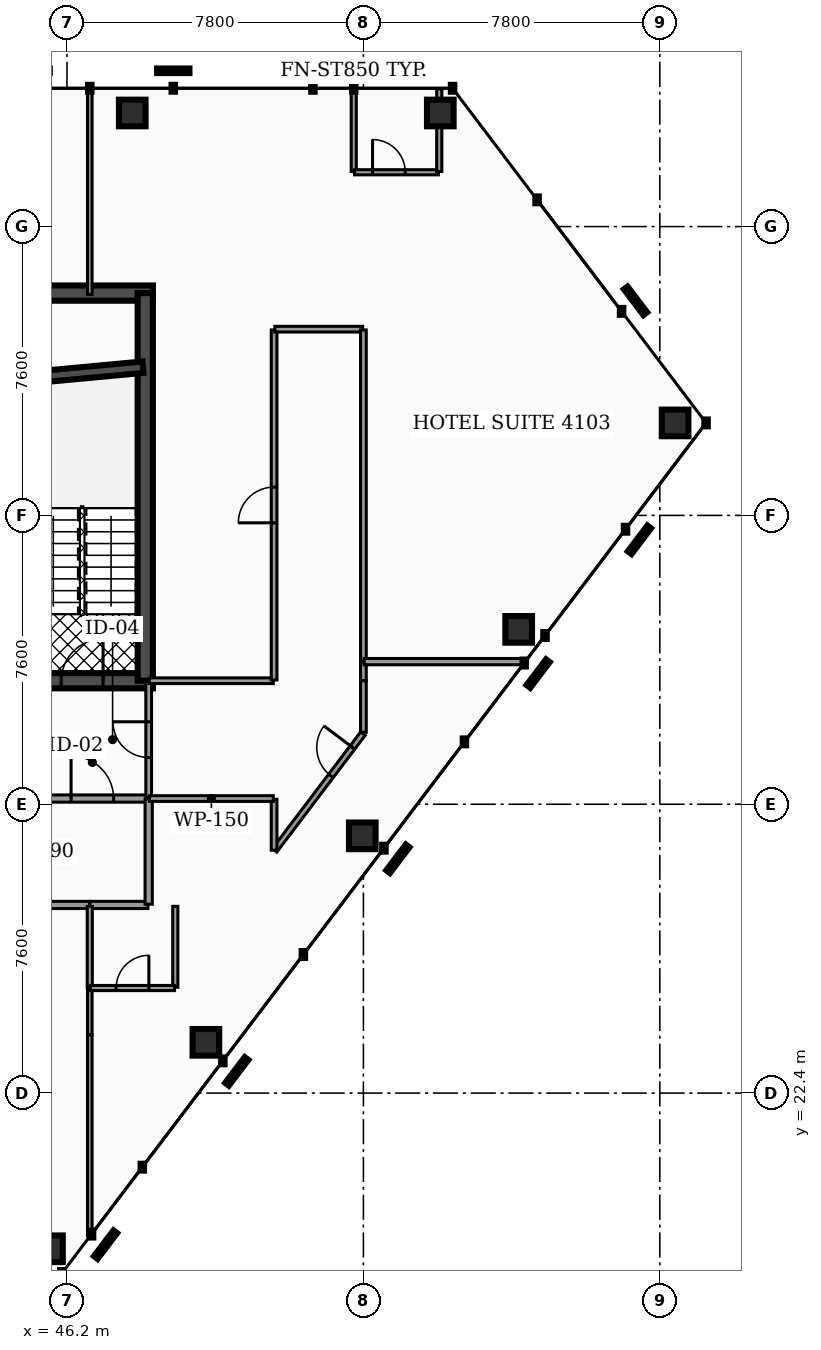
"""IFC4 building model, lengths in metres.
Left out: names, types, materials, properties, quantities, classifications, styles, units other than length and angle.
Written with IfcOpenShell. Run it as: python <this file> out.ifc"""

import sys

from ifc_helpers import new_model, si_unit, direction, frame, frame_2d, origin, origin_2d, place, context, subcontext, project, spatial, rectangle, hollow_rectangle, extrude, element, fill, save


model = new_model("IFC4")
c1 = context("Model", 3, precision=1e-05, world=origin(), true_north=direction((0.0, 1.0)))
c2 = subcontext(c1, "Body", "Model", "MODEL_VIEW")
j1 = project(units=[si_unit("LENGTHUNIT", "METRE"), si_unit("PLANEANGLEUNIT", "RADIAN")], contexts=[c1])
p1 = place(None, origin())
s1 = spatial("IfcSite", under=j1, at=p1, CompositionType="ELEMENT")
p2 = place(p1, origin())
s2 = spatial("IfcBuilding", under=s1, at=p2, CompositionType="ELEMENT")
p3 = place(p2, frame((0.0, 0.0, 168.3)))
s3 = spatial("IfcBuildingStorey", under=s2, at=p3, CompositionType="ELEMENT", Elevation=168.3)
p4 = place(p3, frame((28.4, 43.45, 0.0), z_axis=(0.0, 0.0, 1.0), x_axis=(1.0, 0.0, 0.0)))
e1 = element("IfcWall", 1, at=p4, inside=s3, PredefinedType="SHEAR", context=c2, shape_type="SweptSolid", body=[
    extrude(rectangle(XDim=20.06, YDim=0.4, at=frame_2d((10.03, 0.0))), origin(), (0.0, 0.0, 1.0), 3.5),
])
p5 = place(p3, frame((28.4, 33.25, 0.0), z_axis=(0.0, 0.0, 1.0), x_axis=(1.0, 0.0, 0.0)))
e2 = element("IfcWall", 2, at=p5, inside=s3, PredefinedType="SHEAR", context=c2, shape_type="SweptSolid", body=[
    extrude(rectangle(XDim=20.06, YDim=0.4, at=frame_2d((10.03, 0.0))), origin(), (0.0, 0.0, 1.0), 3.5),
])
p6 = place(p5, frame((4.03, 0.0, 0.0)))
e3 = element("IfcOpeningElement", 3, at=p6, cuts=e2, PredefinedType="OPENING", context=c2, shape_type="SweptSolid", body=[
    extrude(rectangle(XDim=1.1, YDim=2.15, at=frame_2d((0.55, 1.075))), frame((0.0, 0.21, 0.0), z_axis=(0.0, -1.0, 0.0), x_axis=(1.0, 0.0, 0.0)), (0.0, 0.0, 1.0), 0.42),
])
p7 = place(p5, frame((14.87, 0.0, 0.0)))
e4 = element("IfcOpeningElement", 4, at=p7, cuts=e2, PredefinedType="OPENING", context=c2, shape_type="SweptSolid", body=[
    extrude(rectangle(XDim=1.1, YDim=2.15, at=frame_2d((0.55, 1.075))), frame((0.0, 0.21, 0.0), z_axis=(0.0, -1.0, 0.0), x_axis=(1.0, 0.0, 0.0)), (0.0, 0.0, 1.0), 0.42),
])
p8 = place(p5, frame((5.95, 0.0, 0.0)))
e5 = element("IfcOpeningElement", 5, at=p8, cuts=e2, PredefinedType="OPENING", context=c2, shape_type="SweptSolid", body=[
    extrude(rectangle(XDim=1.0, YDim=2.1, at=frame_2d((0.5, 1.05))), frame((0.0, 0.21, 0.0), z_axis=(0.0, -1.0, 0.0), x_axis=(1.0, 0.0, 0.0)), (0.0, 0.0, 1.0), 0.42),
])
p9 = place(p5, frame((7.65, 0.0, 0.0)))
e6 = element("IfcOpeningElement", 6, at=p9, cuts=e2, PredefinedType="OPENING", context=c2, shape_type="SweptSolid", body=[
    extrude(rectangle(XDim=1.0, YDim=2.1, at=frame_2d((0.5, 1.05))), frame((0.0, 0.21, 0.0), z_axis=(0.0, -1.0, 0.0), x_axis=(1.0, 0.0, 0.0)), (0.0, 0.0, 1.0), 0.42),
])
p10 = place(p5, frame((1.31, 0.0, 0.0)))
e7 = element("IfcOpeningElement", 7, at=p10, cuts=e2, PredefinedType="OPENING", context=c2, shape_type="SweptSolid", body=[
    extrude(rectangle(XDim=1.1, YDim=2.2, at=frame_2d((0.55, 1.1))), frame((0.0, 0.21, 0.0), z_axis=(0.0, -1.0, 0.0), x_axis=(1.0, 0.0, 0.0)), (0.0, 0.0, 1.0), 0.42),
])
p11 = place(p5, frame((9.44, 0.0, 0.0)))
e8 = element("IfcOpeningElement", 8, at=p11, cuts=e2, PredefinedType="OPENING", context=c2, shape_type="SweptSolid", body=[
    extrude(rectangle(XDim=1.12, YDim=2.05, at=frame_2d((0.56, 1.025))), frame((0.0, 0.21, 0.0), z_axis=(0.0, -1.0, 0.0), x_axis=(1.0, 0.0, 0.0)), (0.0, 0.0, 1.0), 0.42),
])
p12 = place(p5, frame((17.65, 0.0, 0.0)))
e9 = element("IfcOpeningElement", 9, at=p12, cuts=e2, PredefinedType="OPENING", context=c2, shape_type="SweptSolid", body=[
    extrude(rectangle(XDim=1.1, YDim=2.2, at=frame_2d((0.55, 1.1))), frame((0.0, 0.21, 0.0), z_axis=(0.0, -1.0, 0.0), x_axis=(1.0, 0.0, 0.0)), (0.0, 0.0, 1.0), 0.42),
])
p13 = place(p3, frame((48.26, 33.25, 0.0), z_axis=(0.0, 0.0, 1.0), x_axis=(0.0, 1.0, 0.0)))
e10 = element("IfcWall", 10, at=p13, inside=s3, PredefinedType="SHEAR", context=c2, shape_type="SweptSolid", body=[
    extrude(rectangle(XDim=10.2, YDim=0.4, at=frame_2d((5.1, 0.0))), origin(), (0.0, 0.0, 1.0), 3.5),
])
p14 = place(p3, frame((44.98, 41.2, 0.0), z_axis=(0.0, 0.0, 1.0), x_axis=(0.995686468965, 0.09278176286, 0.0)))
e11 = element("IfcWall", 11, at=p14, inside=s3, PredefinedType="SHEAR", context=c2, shape_type="SweptSolid", body=[
    extrude(rectangle(XDim=3.234, YDim=0.3, at=frame_2d((1.617, 0.0))), origin(), (0.0, 0.0, 1.0), 3.5),
])
for number, where, z_axis, x_axis in (
    (12, (56.024, 48.189, 0.0), (0.0, 0.0, 1.0), (1.0, 0.0, 0.0)),
    (13, (47.917, 48.189, 0.0), (0.0, 0.0, 1.0), (1.0, 0.0, 0.0)),
    (14, (45.74, 18.303, 0.0), (0.0, 0.0, 1.0), (1.0, 0.0, 0.0)),
    (15, (49.855, 23.736, 0.0), (0.0, 0.0, 1.0), (1.0, 0.0, 0.0)),
    (16, (53.971, 29.168, 0.0), (0.0, 0.0, 1.0), (1.0, 0.0, 0.0)),
    (17, (58.086, 34.601, 0.0), (0.0, 0.0, 1.0), (1.0, 0.0, 0.0)),
    (18, (62.202, 40.034, 0.0), (0.0, 0.0, 1.0), (1.0, 0.0, 0.0)),
):
    element("IfcColumn", number, at=place(p3, frame(where, z_axis=z_axis, x_axis=x_axis)), inside=s3, PredefinedType="COLUMN", context=c2, shape_type="SweptSolid", body=[
        extrude(hollow_rectangle(XDim=0.7, YDim=0.7, WallThickness=0.035, at=origin_2d()), origin(), (0.0, 0.0, 1.0), 3.5),
    ])
p15 = place(p3, frame((45.405, 30.15, 0.0), z_axis=(0.0, 0.0, 1.0), x_axis=(1.0, 0.0, 0.0)))
e19 = element("IfcWall", 19, at=p15, inside=s3, PredefinedType="PARTITIONING", context=c2, shape_type="SweptSolid", body=[
    extrude(rectangle(XDim=2.925, YDim=0.19, at=frame_2d((1.462, 0.0))), origin(), (0.0, 0.0, 1.0), 2.457),
])
p16 = place(p15, frame((0.903, 0.0, 0.0)))
e20 = element("IfcOpeningElement", 20, at=p16, cuts=e19, PredefinedType="OPENING", context=c2, shape_type="SweptSolid", body=[
    extrude(rectangle(XDim=1.12, YDim=2.05, at=frame_2d((0.56, 1.025))), frame((0.0, 0.105, 0.0), z_axis=(0.0, -1.0, 0.0), x_axis=(1.0, 0.0, 0.0)), (0.0, 0.0, 1.0), 0.21),
])
p17 = place(p3, frame((48.35, 30.17, 0.0), z_axis=(0.0, 0.0, 1.0), x_axis=(0.0, 1.0, 0.0)))
e21 = element("IfcWall", 21, at=p17, inside=s3, PredefinedType="PARTITIONING", context=c2, shape_type="SweptSolid", body=[
    extrude(rectangle(XDim=3.06, YDim=0.15, at=frame_2d((1.53, 0.0))), origin(), (0.0, 0.0, 1.0), 2.457),
])
p18 = place(p17, frame((1.06, 0.0, 0.0)))
e22 = element("IfcOpeningElement", 22, at=p18, cuts=e21, PredefinedType="OPENING", context=c2, shape_type="SweptSolid", body=[
    extrude(rectangle(XDim=0.94, YDim=2.05, at=frame_2d((0.47, 1.025))), frame((0.0, 0.085, 0.0), z_axis=(0.0, -1.0, 0.0), x_axis=(1.0, 0.0, 0.0)), (0.0, 0.0, 1.0), 0.17),
])
p19 = place(p3, frame((45.42, 27.35, 0.0), z_axis=(0.0, 0.0, 1.0), x_axis=(1.0, 0.0, 0.0)))
e23 = element("IfcWall", 23, at=p19, inside=s3, PredefinedType="PARTITIONING", context=c2, shape_type="SweptSolid", body=[
    extrude(rectangle(XDim=1.375, YDim=0.19, at=frame_2d((0.688, 0.0))), origin(), (0.0, 0.0, 1.0), 2.457),
])
p20 = place(p3, frame((46.805, 27.35, 0.0), z_axis=(0.0, 0.0, 1.0), x_axis=(1.0, 0.0, 0.0)))
e24 = element("IfcWall", 24, at=p20, inside=s3, PredefinedType="PARTITIONING", context=c2, shape_type="SweptSolid", body=[
    extrude(rectangle(XDim=1.525, YDim=0.19, at=frame_2d((0.763, 0.0))), origin(), (0.0, 0.0, 1.0), 2.457),
])
p21 = place(p3, frame((48.35, 27.37, 0.0), z_axis=(0.0, 0.0, 1.0), x_axis=(0.0, 1.0, 0.0)))
e25 = element("IfcWall", 25, at=p21, inside=s3, PredefinedType="PARTITIONING", context=c2, shape_type="SweptSolid", body=[
    extrude(rectangle(XDim=2.76, YDim=0.19, at=frame_2d((1.38, 0.0))), origin(), (0.0, 0.0, 1.0), 2.457),
])
p22 = place(p3, frame((54.0, 33.25, 0.0), z_axis=(0.0, 0.0, 1.0), x_axis=(0.0, 1.0, 0.0)))
e26 = element("IfcWall", 26, at=p22, inside=s3, PredefinedType="PARTITIONING", context=c2, shape_type="SweptSolid", body=[
    extrude(rectangle(XDim=0.498, YDim=0.15, at=frame_2d((0.249, 0.0))), origin(), (0.0, 0.0, 1.0), 2.457),
])
p23 = place(p3, frame((54.0, 31.894, 0.0), z_axis=(0.0, 0.0, 1.0), x_axis=(0.0, 1.0, 0.0)))
e27 = element("IfcWall", 27, at=p23, inside=s3, PredefinedType="PARTITIONING", context=c2, shape_type="SweptSolid", body=[
    extrude(rectangle(XDim=1.356, YDim=0.15, at=frame_2d((0.678, 0.0))), origin(), (0.0, 0.0, 1.0), 2.457),
])
p24 = place(p3, frame((51.662, 28.787, 0.0), z_axis=(0.0, 0.0, 1.0), x_axis=(0.603806431354, 0.797130976349, 0.0)))
e28 = element("IfcWall", 28, at=p24, inside=s3, PredefinedType="PARTITIONING", context=c2, shape_type="SweptSolid", body=[
    extrude(rectangle(XDim=3.852, YDim=0.15, at=frame_2d((1.926, 0.0))), origin(), (0.0, 0.0, 1.0), 2.457),
])
p25 = place(p24, frame((2.456, 0.0, 0.0)))
e29 = element("IfcOpeningElement", 29, at=p25, cuts=e28, PredefinedType="OPENING", context=c2, shape_type="SweptSolid", body=[
    extrude(rectangle(XDim=0.94, YDim=2.05, at=frame_2d((0.47, 1.025))), frame((0.0, 0.085, 0.0), z_axis=(0.0, -1.0, 0.0), x_axis=(1.0, 0.0, 0.0)), (0.0, 0.0, 1.0), 0.17),
])
p26 = place(p3, frame((51.65, 28.792, 0.0), z_axis=(0.0, 0.0, 1.0), x_axis=(0.0, 1.0, 0.0)))
e30 = element("IfcWall", 30, at=p26, inside=s3, PredefinedType="PARTITIONING", context=c2, shape_type="SweptSolid", body=[
    extrude(rectangle(XDim=1.338, YDim=0.15, at=frame_2d((0.669, 0.0))), origin(), (0.0, 0.0, 1.0), 2.457),
])
p27 = place(p3, frame((48.37, 30.15, 0.0), z_axis=(0.0, 0.0, 1.0), x_axis=(1.0, 0.0, 0.0)))
e31 = element("IfcWall", 31, at=p27, inside=s3, PredefinedType="PARTITIONING", context=c2, shape_type="SweptSolid", body=[
    extrude(rectangle(XDim=3.26, YDim=0.15, at=frame_2d((1.63, 0.0))), origin(), (0.0, 0.0, 1.0), 2.457),
])
p28 = place(p3, frame((48.365, 33.25, 0.0), z_axis=(0.0, 0.0, 1.0), x_axis=(1.0, 0.0, 0.0)))
e32 = element("IfcWall", 32, at=p28, inside=s3, PredefinedType="PARTITIONING", context=c2, shape_type="SweptSolid", body=[
    extrude(rectangle(XDim=3.265, YDim=0.15, at=frame_2d((1.632, 0.0))), origin(), (0.0, 0.0, 1.0), 2.457),
])
p29 = place(p3, frame((51.65, 33.27, 0.0), z_axis=(0.0, 0.0, 1.0), x_axis=(0.0, 1.0, 0.0)))
e33 = element("IfcWall", 33, at=p29, inside=s3, PredefinedType="PARTITIONING", context=c2, shape_type="SweptSolid", body=[
    extrude(rectangle(XDim=9.21, YDim=0.15, at=frame_2d((4.605, 0.0))), origin(), (0.0, 0.0, 1.0), 2.457),
])
p30 = place(p29, frame((4.135, 0.0, 0.0)))
e34 = element("IfcOpeningElement", 34, at=p30, cuts=e33, PredefinedType="OPENING", context=c2, shape_type="SweptSolid", body=[
    extrude(rectangle(XDim=0.94, YDim=2.05, at=frame_2d((0.47, 1.025))), frame((0.0, 0.085, 0.0), z_axis=(0.0, -1.0, 0.0), x_axis=(1.0, 0.0, 0.0)), (0.0, 0.0, 1.0), 0.17),
])
p31 = place(p3, frame((51.67, 42.5, 0.0), z_axis=(0.0, 0.0, 1.0), x_axis=(1.0, 0.0, 0.0)))
e35 = element("IfcWall", 35, at=p31, inside=s3, PredefinedType="PARTITIONING", context=c2, shape_type="SweptSolid", body=[
    extrude(rectangle(XDim=2.31, YDim=0.15, at=frame_2d((1.155, 0.0))), origin(), (0.0, 0.0, 1.0), 2.457),
])
p32 = place(p3, frame((54.0, 33.758, 0.0), z_axis=(0.0, 0.0, 1.0), x_axis=(0.0, 1.0, 0.0)))
e36 = element("IfcWall", 36, at=p32, inside=s3, PredefinedType="PARTITIONING", context=c2, shape_type="SweptSolid", body=[
    extrude(rectangle(XDim=8.722, YDim=0.15, at=frame_2d((4.361, 0.0))), origin(), (0.0, 0.0, 1.0), 2.457),
])
p33 = place(p3, frame((46.8, 23.932, 0.0), z_axis=(0.0, 0.0, 1.0), x_axis=(0.0, 1.0, 0.0)))
e37 = element("IfcWall", 37, at=p33, inside=s3, PredefinedType="PARTITIONING", context=c2, shape_type="SweptSolid", body=[
    extrude(rectangle(XDim=1.228, YDim=0.12, at=frame_2d((0.614, 0.0))), origin(), (0.0, 0.0, 1.0), 2.457),
])
p34 = place(p3, frame((46.8, 18.642, 0.0), z_axis=(0.0, 0.0, 1.0), x_axis=(0.0, 1.0, 0.0)))
e38 = element("IfcWall", 38, at=p34, inside=s3, PredefinedType="PARTITIONING", context=c2, shape_type="SweptSolid", body=[
    extrude(rectangle(XDim=5.29, YDim=0.12, at=frame_2d((2.645, 0.0))), origin(), (0.0, 0.0, 1.0), 2.457),
])
p35 = place(p3, frame((46.8, 25.169, 0.0), z_axis=(0.0, 0.0, 1.0), x_axis=(0.0, 1.0, 0.0)))
e39 = element("IfcWall", 39, at=p35, inside=s3, PredefinedType="PARTITIONING", context=c2, shape_type="SweptSolid", body=[
    extrude(rectangle(XDim=2.14, YDim=0.135, at=frame_2d((1.07, 0.0))), origin(), (0.0, 0.0, 1.0), 2.457),
])
p36 = place(p3, frame((46.8, 43.415, 0.0), z_axis=(0.0, 0.0, 1.0), x_axis=(0.0, 1.0, 0.0)))
e40 = element("IfcWall", 40, at=p36, inside=s3, PredefinedType="PARTITIONING", context=c2, shape_type="SweptSolid", body=[
    extrude(rectangle(XDim=5.409, YDim=0.12, at=frame_2d((2.705, 0.0))), origin(), (0.0, 0.0, 1.0), 2.457),
])
p37 = place(p3, frame((49.05, 25.184, 0.0), z_axis=(0.0, 0.0, 1.0), x_axis=(0.0, 1.0, 0.0)))
e41 = element("IfcWall", 41, at=p37, inside=s3, PredefinedType="PARTITIONING", context=c2, shape_type="SweptSolid", body=[
    extrude(rectangle(XDim=2.13, YDim=0.135, at=frame_2d((1.065, 0.0))), origin(), (0.0, 0.0, 1.0), 2.457),
])
p38 = place(p3, frame((46.82, 25.164, 0.0), z_axis=(0.0, 0.0, 1.0), x_axis=(1.0, 0.0, 0.0)))
e42 = element("IfcWall", 42, at=p38, inside=s3, PredefinedType="PARTITIONING", context=c2, shape_type="SweptSolid", body=[
    extrude(rectangle(XDim=2.21, YDim=0.135, at=frame_2d((1.105, 0.0))), origin(), (0.0, 0.0, 1.0), 2.457),
])
p39 = place(p38, frame((0.675, 0.0, 0.0)))
e43 = element("IfcOpeningElement", 43, at=p39, cuts=e42, PredefinedType="OPENING", context=c2, shape_type="SweptSolid", body=[
    extrude(rectangle(XDim=0.86, YDim=2.05, at=frame_2d((0.43, 1.025))), frame((0.0, 0.077, 0.0), z_axis=(0.0, -1.0, 0.0), x_axis=(1.0, 0.0, 0.0)), (0.0, 0.0, 1.0), 0.155),
])
p40 = place(p3, frame((54.02, 33.753, 0.0), z_axis=(0.0, 0.0, 1.0), x_axis=(1.0, 0.0, 0.0)))
e44 = element("IfcWall", 44, at=p40, inside=s3, PredefinedType="PARTITIONING", context=c2, shape_type="SweptSolid", body=[
    extrude(rectangle(XDim=4.224, YDim=0.165, at=frame_2d((2.112, 0.0))), origin(), (0.0, 0.0, 1.0), 2.457),
])
p41 = place(p3, frame((53.746, 46.649, 0.0), z_axis=(0.0, 0.0, 1.0), x_axis=(0.0, 1.0, 0.0)))
e45 = element("IfcWall", 45, at=p41, inside=s3, PredefinedType="PARTITIONING", context=c2, shape_type="SweptSolid", body=[
    extrude(rectangle(XDim=2.175, YDim=0.135, at=frame_2d((1.087, 0.0))), origin(), (0.0, 0.0, 1.0), 2.457),
])
p42 = place(p3, frame((53.766, 46.629, 0.0), z_axis=(0.0, 0.0, 1.0), x_axis=(1.0, 0.0, 0.0)))
e46 = element("IfcWall", 46, at=p42, inside=s3, PredefinedType="PARTITIONING", context=c2, shape_type="SweptSolid", body=[
    extrude(rectangle(XDim=2.21, YDim=0.135, at=frame_2d((1.105, 0.0))), origin(), (0.0, 0.0, 1.0), 2.457),
])
p43 = place(p42, frame((0.475, 0.0, 0.0)))
e47 = element("IfcOpeningElement", 47, at=p43, cuts=e46, PredefinedType="OPENING", context=c2, shape_type="SweptSolid", body=[
    extrude(rectangle(XDim=0.86, YDim=2.05, at=frame_2d((0.43, 1.025))), frame((0.0, 0.077, 0.0), z_axis=(0.0, -1.0, 0.0), x_axis=(1.0, 0.0, 0.0)), (0.0, 0.0, 1.0), 0.155),
])
p44 = place(p3, frame((55.996, 46.649, 0.0), z_axis=(0.0, 0.0, 1.0), x_axis=(0.0, 1.0, 0.0)))
e48 = element("IfcWall", 48, at=p44, inside=s3, PredefinedType="PARTITIONING", context=c2, shape_type="SweptSolid", body=[
    extrude(rectangle(XDim=2.175, YDim=0.135, at=frame_2d((1.087, 0.0))), origin(), (0.0, 0.0, 1.0), 2.457),
])
p45 = place(p12, origin())
e49 = element("IfcDoor", 49, at=p45, inside=s3, OperationType="SINGLE_SWING_RIGHT", PredefinedType="DOOR", context=c2, shape_type="SweptSolid", body=[
    extrude(rectangle(XDim=1.1, YDim=2.2, at=frame_2d((0.55, 1.1))), frame((0.0, 0.025, 0.0), z_axis=(0.0, -1.0, 0.0), x_axis=(1.0, 0.0, 0.0)), (0.0, 0.0, 1.0), 0.05),
])
fill(e9, e49)
p46 = place(p16, origin())
e50 = element("IfcDoor", 50, at=p46, inside=s3, OperationType="SINGLE_SWING_LEFT", PredefinedType="DOOR", context=c2, shape_type="SweptSolid", body=[
    extrude(rectangle(XDim=1.12, YDim=2.05, at=frame_2d((0.56, 1.025))), frame((0.0, 0.025, 0.0), z_axis=(0.0, -1.0, 0.0), x_axis=(1.0, 0.0, 0.0)), (0.0, 0.0, 1.0), 0.05),
])
fill(e20, e50)
p47 = place(p18, origin())
e51 = element("IfcDoor", 51, at=p47, inside=s3, OperationType="SINGLE_SWING_RIGHT", PredefinedType="DOOR", context=c2, shape_type="SweptSolid", body=[
    extrude(rectangle(XDim=0.94, YDim=2.05, at=frame_2d((0.47, 1.025))), frame((0.0, 0.025, 0.0), z_axis=(0.0, -1.0, 0.0), x_axis=(1.0, 0.0, 0.0)), (0.0, 0.0, 1.0), 0.05),
])
fill(e22, e51)
p48 = place(p25, origin())
e52 = element("IfcDoor", 52, at=p48, inside=s3, OperationType="SINGLE_SWING_RIGHT", PredefinedType="DOOR", context=c2, shape_type="SweptSolid", body=[
    extrude(rectangle(XDim=0.94, YDim=2.05, at=frame_2d((0.47, 1.025))), frame((0.0, 0.025, 0.0), z_axis=(0.0, -1.0, 0.0), x_axis=(1.0, 0.0, 0.0)), (0.0, 0.0, 1.0), 0.05),
])
fill(e29, e52)
p49 = place(p30, origin())
e53 = element("IfcDoor", 53, at=p49, inside=s3, OperationType="SINGLE_SWING_LEFT", PredefinedType="DOOR", context=c2, shape_type="SweptSolid", body=[
    extrude(rectangle(XDim=0.94, YDim=2.05, at=frame_2d((0.47, 1.025))), frame((0.0, 0.025, 0.0), z_axis=(0.0, -1.0, 0.0), x_axis=(1.0, 0.0, 0.0)), (0.0, 0.0, 1.0), 0.05),
])
fill(e34, e53)
p50 = place(p39, origin())
e54 = element("IfcDoor", 54, at=p50, inside=s3, OperationType="SINGLE_SWING_RIGHT", PredefinedType="DOOR", context=c2, shape_type="SweptSolid", body=[
    extrude(rectangle(XDim=0.86, YDim=2.05, at=frame_2d((0.43, 1.025))), frame((0.0, 0.025, 0.0), z_axis=(0.0, -1.0, 0.0), x_axis=(1.0, 0.0, 0.0)), (0.0, 0.0, 1.0), 0.05),
])
fill(e43, e54)
p51 = place(p43, origin())
e55 = element("IfcDoor", 55, at=p51, inside=s3, OperationType="SINGLE_SWING_LEFT", PredefinedType="DOOR", context=c2, shape_type="SweptSolid", body=[
    extrude(rectangle(XDim=0.86, YDim=2.05, at=frame_2d((0.43, 1.025))), frame((0.0, 0.025, 0.0), z_axis=(0.0, -1.0, 0.0), x_axis=(1.0, 0.0, 0.0)), (0.0, 0.0, 1.0), 0.05),
])
fill(e47, e55)
save(model, sys.argv[1])
